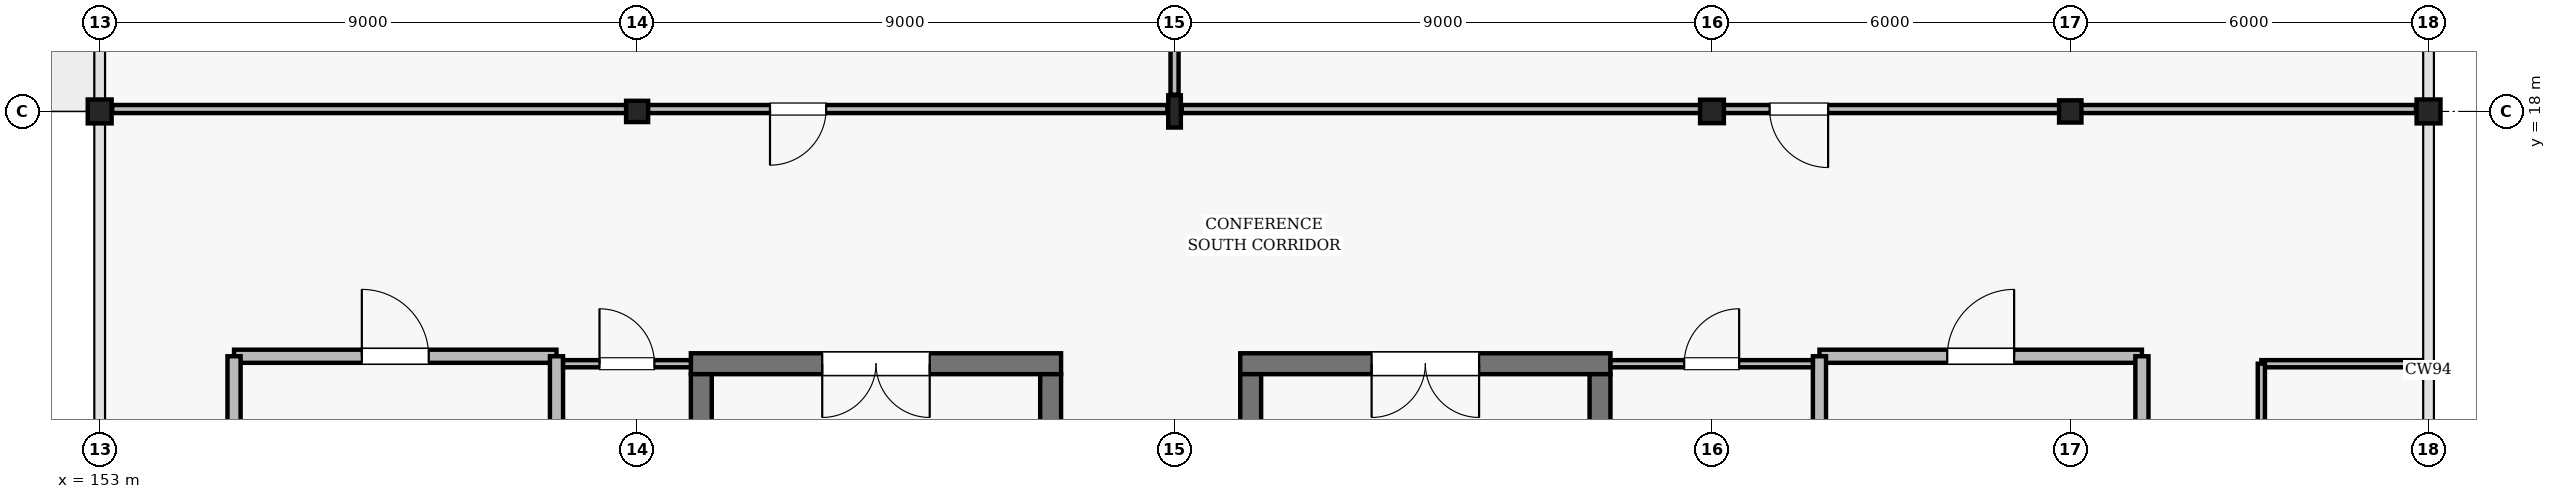
"""IFC4 building model, lengths in metres.
Left out: names, types, materials, properties, quantities, classifications, styles, units other than length and angle.
Written with IfcOpenShell. Run it as: python <this file> out.ifc"""

import sys

from ifc_helpers import new_model, si_unit, direction, frame, frame_2d, origin, origin_2d, place, context, subcontext, project, spatial, rectangle, hollow_rectangle, i_section, extrude, element, fill, save


model = new_model("IFC4")
c1 = context("Model", 3, precision=1e-05, world=origin(), true_north=direction((0.0, 1.0)))
c2 = subcontext(c1, "Body", "Model", "MODEL_VIEW")
j1 = project(units=[si_unit("LENGTHUNIT", "METRE"), si_unit("PLANEANGLEUNIT", "RADIAN")], contexts=[c1])
p1 = place(None, origin())
s1 = spatial("IfcSite", under=j1, at=p1, CompositionType="ELEMENT")
p2 = place(p1, origin())
s2 = spatial("IfcBuilding", under=s1, at=p2, CompositionType="ELEMENT")
p3 = place(p2, frame((0.0, 0.0, 15.6)))
s3 = spatial("IfcBuildingStorey", under=s2, at=p3, CompositionType="ELEMENT", Elevation=15.6)
p4 = place(p3, frame((153.0, 18.0, 0.0), z_axis=(0.0, 0.0, 1.0), x_axis=(1.0, 0.0, 0.0)))
e1 = element("IfcColumn", 1, at=p4, inside=s3, PredefinedType="COLUMN", context=c2, shape_type="SweptSolid", body=[
    extrude(hollow_rectangle(XDim=0.4, YDim=0.4, WallThickness=0.016, InnerFilletRadius=0.016, OuterFilletRadius=0.032, at=origin_2d()), origin(), (0.0, 0.0, 1.0), 4.8),
])
p5 = place(p3, frame((162.0, 18.0, 0.0), z_axis=(0.0, 0.0, 1.0), x_axis=(1.0, 0.0, 0.0)))
e2 = element("IfcColumn", 2, at=p5, inside=s3, PredefinedType="COLUMN", context=c2, shape_type="SweptSolid", body=[
    extrude(i_section(OverallWidth=0.369, OverallDepth=0.356, WebThickness=0.011, FlangeThickness=0.018, FilletRadius=0.015, at=origin_2d()), origin(), (0.0, 0.0, 1.0), 4.8),
])
p6 = place(p3, frame((171.0, 18.0, 0.0), z_axis=(0.0, 0.0, 1.0), x_axis=(1.0, 0.0, 0.0)))
e3 = element("IfcColumn", 3, at=p6, inside=s3, PredefinedType="COLUMN", context=c2, shape_type="SweptSolid", body=[
    extrude(i_section(OverallWidth=0.211, OverallDepth=0.539, WebThickness=0.012, FlangeThickness=0.019, FilletRadius=0.014, at=origin_2d()), origin(), (0.0, 0.0, 1.0), 4.8),
])
p7 = place(p3, frame((180.0, 18.0, 0.0), z_axis=(0.0, 0.0, 1.0), x_axis=(1.0, 0.0, 0.0)))
e4 = element("IfcColumn", 4, at=p7, inside=s3, PredefinedType="COLUMN", context=c2, shape_type="SweptSolid", body=[
    extrude(i_section(OverallWidth=0.399, OverallDepth=0.393, WebThickness=0.023, FlangeThickness=0.037, FilletRadius=0.018, at=origin_2d()), origin(), (0.0, 0.0, 1.0), 4.8),
])
p8 = place(p3, frame((186.0, 18.0, 0.0), z_axis=(0.0, 0.0, 1.0), x_axis=(1.0, 0.0, 0.0)))
e5 = element("IfcColumn", 5, at=p8, inside=s3, PredefinedType="COLUMN", context=c2, shape_type="SweptSolid", body=[
    extrude(i_section(OverallWidth=0.374, OverallDepth=0.372, WebThickness=0.016, FlangeThickness=0.026, FilletRadius=0.016, at=origin_2d()), origin(), (0.0, 0.0, 1.0), 4.8),
])
p9 = place(p3, frame((192.0, 18.0, 0.0), z_axis=(0.0, 0.0, 1.0), x_axis=(1.0, 0.0, 0.0)))
e6 = element("IfcColumn", 6, at=p9, inside=s3, PredefinedType="COLUMN", context=c2, shape_type="SweptSolid", body=[
    extrude(hollow_rectangle(XDim=0.4, YDim=0.4, WallThickness=0.016, InnerFilletRadius=0.016, OuterFilletRadius=0.032, at=origin_2d()), origin(), (0.0, 0.0, 1.0), 4.8),
])
p10 = place(p3, frame((169.1, 13.775, 0.0), z_axis=(0.0, 0.0, 1.0), x_axis=(-1.0, 0.0, 0.0)))
e7 = element("IfcWall", 7, at=p10, inside=s3, PredefinedType="SHEAR", context=c2, shape_type="SweptSolid", body=[
    extrude(rectangle(XDim=6.2, YDim=0.35, at=frame_2d((3.1, 0.0))), origin(), (0.0, 0.0, 1.0), 4.6),
])
p11 = place(p10, frame((2.2, 0.0, 0.0)))
e8 = element("IfcOpeningElement", 8, at=p11, cuts=e7, PredefinedType="OPENING", context=c2, shape_type="SweptSolid", body=[
    extrude(rectangle(XDim=1.8, YDim=2.2, at=frame_2d((0.9, 1.1))), frame((0.0, 0.185, 0.0), z_axis=(0.0, -1.0, 0.0), x_axis=(1.0, 0.0, 0.0)), (0.0, 0.0, 1.0), 0.37),
])
for number, where, z_axis, x_axis in (
    (9, (163.075, 13.6, 0.0), (0.0, 0.0, 1.0), (0.0, -1.0, 0.0)),
    (10, (168.925, 2.2, 0.0), (0.0, 0.0, 1.0), (0.0, 1.0, 0.0)),
):
    element("IfcWall", number, at=place(p3, frame(where, z_axis=z_axis, x_axis=x_axis)), inside=s3, PredefinedType="SHEAR", context=c2, shape_type="SweptSolid", body=[
        extrude(rectangle(XDim=11.4, YDim=0.35, at=frame_2d((5.7, 0.0))), origin(), (0.0, 0.0, 1.0), 4.6),
    ])
p12 = place(p3, frame((178.3, 13.775, 0.0), z_axis=(0.0, 0.0, 1.0), x_axis=(-1.0, 0.0, 0.0)))
e11 = element("IfcWall", 11, at=p12, inside=s3, PredefinedType="SHEAR", context=c2, shape_type="SweptSolid", body=[
    extrude(rectangle(XDim=6.2, YDim=0.35, at=frame_2d((3.1, 0.0))), origin(), (0.0, 0.0, 1.0), 4.6),
])
p13 = place(p12, frame((2.2, 0.0, 0.0)))
e12 = element("IfcOpeningElement", 12, at=p13, cuts=e11, PredefinedType="OPENING", context=c2, shape_type="SweptSolid", body=[
    extrude(rectangle(XDim=1.8, YDim=2.2, at=frame_2d((0.9, 1.1))), frame((0.0, 0.185, 0.0), z_axis=(0.0, -1.0, 0.0), x_axis=(1.0, 0.0, 0.0)), (0.0, 0.0, 1.0), 0.37),
])
for number, where, z_axis, x_axis in (
    (13, (172.275, 13.6, 0.0), (0.0, 0.0, 1.0), (0.0, -1.0, 0.0)),
    (14, (178.125, 2.2, 0.0), (0.0, 0.0, 1.0), (0.0, 1.0, 0.0)),
):
    element("IfcWall", number, at=place(p3, frame(where, z_axis=z_axis, x_axis=x_axis)), inside=s3, PredefinedType="SHEAR", context=c2, shape_type="SweptSolid", body=[
        extrude(rectangle(XDim=11.4, YDim=0.35, at=frame_2d((5.7, 0.0))), origin(), (0.0, 0.0, 1.0), 4.6),
    ])
p14 = place(p3, frame((155.25, 13.9, 0.0), z_axis=(0.0, 0.0, 1.0), x_axis=(1.0, 0.0, 0.0)))
e15 = element("IfcWall", 15, at=p14, inside=s3, PredefinedType="SOLIDWALL", context=c2, shape_type="SweptSolid", body=[
    extrude(rectangle(XDim=5.4, YDim=0.22, at=frame_2d((2.7, 0.0))), origin(), (0.0, 0.0, 1.0), 4.6),
])
p15 = place(p14, frame((2.14, 0.0, 0.0)))
e16 = element("IfcOpeningElement", 16, at=p15, cuts=e15, PredefinedType="OPENING", context=c2, shape_type="SweptSolid", body=[
    extrude(rectangle(XDim=1.12, YDim=2.2, at=frame_2d((0.56, 1.1))), frame((0.0, 0.12, 0.0), z_axis=(0.0, -1.0, 0.0), x_axis=(1.0, 0.0, 0.0)), (0.0, 0.0, 1.0), 0.24),
])
for number, where, z_axis, x_axis in (
    (17, (155.25, 10.85, 0.0), (0.0, 0.0, 1.0), (0.0, 1.0, 0.0)),
    (18, (160.65, 10.85, 0.0), (0.0, 0.0, 1.0), (0.0, 1.0, 0.0)),
):
    element("IfcWall", number, at=place(p3, frame(where, z_axis=z_axis, x_axis=x_axis)), inside=s3, PredefinedType="SOLIDWALL", context=c2, shape_type="SweptSolid", body=[
        extrude(rectangle(XDim=3.05, YDim=0.22, at=frame_2d((1.525, 0.0))), origin(), (0.0, 0.0, 1.0), 4.6),
    ])
p16 = place(p3, frame((181.8, 13.9, 0.0), z_axis=(0.0, 0.0, 1.0), x_axis=(1.0, 0.0, 0.0)))
e19 = element("IfcWall", 19, at=p16, inside=s3, PredefinedType="SOLIDWALL", context=c2, shape_type="SweptSolid", body=[
    extrude(rectangle(XDim=5.4, YDim=0.22, at=frame_2d((2.7, 0.0))), origin(), (0.0, 0.0, 1.0), 4.6),
])
p17 = place(p16, frame((2.14, 0.0, 0.0)))
e20 = element("IfcOpeningElement", 20, at=p17, cuts=e19, PredefinedType="OPENING", context=c2, shape_type="SweptSolid", body=[
    extrude(rectangle(XDim=1.12, YDim=2.2, at=frame_2d((0.56, 1.1))), frame((0.0, 0.12, 0.0), z_axis=(0.0, -1.0, 0.0), x_axis=(1.0, 0.0, 0.0)), (0.0, 0.0, 1.0), 0.24),
])
for number, where, z_axis, x_axis in (
    (21, (181.8, 10.85, 0.0), (0.0, 0.0, 1.0), (0.0, 1.0, 0.0)),
    (22, (187.2, 10.85, 0.0), (0.0, 0.0, 1.0), (0.0, 1.0, 0.0)),
):
    element("IfcWall", number, at=place(p3, frame(where, z_axis=z_axis, x_axis=x_axis)), inside=s3, PredefinedType="SOLIDWALL", context=c2, shape_type="SweptSolid", body=[
        extrude(rectangle(XDim=3.05, YDim=0.22, at=frame_2d((1.525, 0.0))), origin(), (0.0, 0.0, 1.0), 4.6),
    ])
p18 = place(p3, frame((160.76, 13.775, 0.0), z_axis=(0.0, 0.0, 1.0), x_axis=(1.0, 0.0, 0.0)))
e23 = element("IfcWall", 23, at=p18, inside=s3, PredefinedType="PARTITIONING", context=c2, shape_type="SweptSolid", body=[
    extrude(rectangle(XDim=2.14, YDim=0.12, at=frame_2d((1.07, 0.0))), origin(), (0.0, 0.0, 1.0), 3.901),
])
p19 = place(p18, frame((0.61, 0.0, 0.0)))
e24 = element("IfcOpeningElement", 24, at=p19, cuts=e23, PredefinedType="OPENING", context=c2, shape_type="SweptSolid", body=[
    extrude(rectangle(XDim=0.92, YDim=2.12, at=frame_2d((0.46, 1.06))), frame((0.0, 0.07, 0.0), z_axis=(0.0, -1.0, 0.0), x_axis=(1.0, 0.0, 0.0)), (0.0, 0.0, 1.0), 0.14),
])
p20 = place(p3, frame((178.3, 13.775, 0.0), z_axis=(0.0, 0.0, 1.0), x_axis=(1.0, 0.0, 0.0)))
e25 = element("IfcWall", 25, at=p20, inside=s3, PredefinedType="PARTITIONING", context=c2, shape_type="SweptSolid", body=[
    extrude(rectangle(XDim=3.39, YDim=0.12, at=frame_2d((1.695, 0.0))), origin(), (0.0, 0.0, 1.0), 3.812),
])
p21 = place(p20, frame((1.235, 0.0, 0.0)))
e26 = element("IfcOpeningElement", 26, at=p21, cuts=e25, PredefinedType="OPENING", context=c2, shape_type="SweptSolid", body=[
    extrude(rectangle(XDim=0.92, YDim=2.12, at=frame_2d((0.46, 1.06))), frame((0.0, 0.07, 0.0), z_axis=(0.0, -1.0, 0.0), x_axis=(1.0, 0.0, 0.0)), (0.0, 0.0, 1.0), 0.14),
])
p22 = place(p3, frame((189.2, 13.775, 0.0), z_axis=(0.0, 0.0, 1.0), x_axis=(1.0, 0.0, 0.0)))
e27 = element("IfcWall", 27, at=p22, inside=s3, PredefinedType="PARTITIONING", context=c2, shape_type="SweptSolid", body=[
    extrude(rectangle(XDim=2.788, YDim=0.12, at=frame_2d((1.394, 0.0))), origin(), (0.0, 0.0, 1.0), 4.119),
])
p23 = place(p3, frame((189.2, 9.65, 0.0), z_axis=(0.0, 0.0, 1.0), x_axis=(0.0, 1.0, 0.0)))
e28 = element("IfcWall", 28, at=p23, inside=s3, PredefinedType="PARTITIONING", context=c2, shape_type="SweptSolid", body=[
    extrude(rectangle(XDim=4.125, YDim=0.12, at=frame_2d((2.062, 0.0))), origin(), (0.0, 0.0, 1.0), 4.6),
])
p24 = place(p23, frame((1.552, 0.0, 0.0)))
e29 = element("IfcOpeningElement", 29, at=p24, cuts=e28, PredefinedType="OPENING", context=c2, shape_type="SweptSolid", body=[
    extrude(rectangle(XDim=1.02, YDim=2.16, at=frame_2d((0.51, 1.08))), frame((0.0, 0.07, 0.0), z_axis=(0.0, -1.0, 0.0), x_axis=(1.0, 0.0, 0.0)), (0.0, 0.0, 1.0), 0.14),
])
p25 = place(p3, frame((171.0, 36.0, 0.0), z_axis=(0.0, 0.0, 1.0), x_axis=(0.0, -1.0, 0.0)))
e30 = element("IfcWall", 30, at=p25, inside=s3, PredefinedType="PARTITIONING", context=c2, shape_type="SweptSolid", body=[
    extrude(rectangle(XDim=17.72, YDim=0.135, at=frame_2d((8.86, 0.0))), origin(), (0.0, 0.0, 1.0), 3.673),
])
p26 = place(p3, frame((170.88, 18.04, 0.0), z_axis=(0.0, 0.0, 1.0), x_axis=(-1.0, 0.0, 0.0)))
e31 = element("IfcWall", 31, at=p26, inside=s3, PredefinedType="PARTITIONING", context=c2, shape_type="SweptSolid", body=[
    extrude(rectangle(XDim=17.67, YDim=0.135, at=frame_2d((8.835, 0.0))), origin(), (0.0, 0.0, 1.0), 3.73),
])
p27 = place(p26, frame((5.715, 0.0, 0.0)))
e32 = element("IfcOpeningElement", 32, at=p27, cuts=e31, PredefinedType="OPENING", context=c2, shape_type="SweptSolid", body=[
    extrude(rectangle(XDim=0.94, YDim=2.15, at=frame_2d((0.47, 1.075))), frame((0.0, 0.078, 0.0), z_axis=(0.0, -1.0, 0.0), x_axis=(1.0, 0.0, 0.0)), (0.0, 0.0, 1.0), 0.155),
])
p28 = place(p3, frame((191.79, 18.04, 0.0), z_axis=(0.0, 0.0, 1.0), x_axis=(-1.0, 0.0, 0.0)))
e33 = element("IfcWall", 33, at=p28, inside=s3, PredefinedType="PARTITIONING", context=c2, shape_type="SweptSolid", body=[
    extrude(rectangle(XDim=20.67, YDim=0.135, at=frame_2d((10.335, 0.0))), origin(), (0.0, 0.0, 1.0), 3.73),
])
p29 = place(p28, frame((9.845, 0.0, 0.0)))
e34 = element("IfcOpeningElement", 34, at=p29, cuts=e33, PredefinedType="OPENING", context=c2, shape_type="SweptSolid", body=[
    extrude(rectangle(XDim=0.98, YDim=2.15, at=frame_2d((0.49, 1.075))), frame((0.0, 0.078, 0.0), z_axis=(0.0, -1.0, 0.0), x_axis=(1.0, 0.0, 0.0)), (0.0, 0.0, 1.0), 0.155),
])
p30 = place(p11, origin())
e35 = element("IfcDoor", 35, at=p30, inside=s3, OperationType="DOUBLE_DOOR_SINGLE_SWING", PredefinedType="DOOR", context=c2, shape_type="SweptSolid", body=[
    extrude(rectangle(XDim=1.8, YDim=2.2, at=frame_2d((0.9, 1.1))), frame((0.0, 0.025, 0.0), z_axis=(0.0, -1.0, 0.0), x_axis=(1.0, 0.0, 0.0)), (0.0, 0.0, 1.0), 0.05),
])
fill(e8, e35)
p31 = place(p13, origin())
e36 = element("IfcDoor", 36, at=p31, inside=s3, OperationType="DOUBLE_DOOR_SINGLE_SWING", PredefinedType="DOOR", context=c2, shape_type="SweptSolid", body=[
    extrude(rectangle(XDim=1.8, YDim=2.2, at=frame_2d((0.9, 1.1))), frame((0.0, 0.025, 0.0), z_axis=(0.0, -1.0, 0.0), x_axis=(1.0, 0.0, 0.0)), (0.0, 0.0, 1.0), 0.05),
])
fill(e12, e36)
p32 = place(p15, origin())
e37 = element("IfcDoor", 37, at=p32, inside=s3, OperationType="SINGLE_SWING_LEFT", PredefinedType="DOOR", context=c2, shape_type="SweptSolid", body=[
    extrude(rectangle(XDim=1.12, YDim=2.2, at=frame_2d((0.56, 1.1))), frame((0.0, 0.025, 0.0), z_axis=(0.0, -1.0, 0.0), x_axis=(1.0, 0.0, 0.0)), (0.0, 0.0, 1.0), 0.05),
])
fill(e16, e37)
p33 = place(p17, origin())
e38 = element("IfcDoor", 38, at=p33, inside=s3, OperationType="SINGLE_SWING_RIGHT", PredefinedType="DOOR", context=c2, shape_type="SweptSolid", body=[
    extrude(rectangle(XDim=1.12, YDim=2.2, at=frame_2d((0.56, 1.1))), frame((0.0, 0.025, 0.0), z_axis=(0.0, -1.0, 0.0), x_axis=(1.0, 0.0, 0.0)), (0.0, 0.0, 1.0), 0.05),
])
fill(e20, e38)
p34 = place(p19, origin())
e39 = element("IfcDoor", 39, at=p34, inside=s3, OperationType="SINGLE_SWING_LEFT", PredefinedType="DOOR", context=c2, shape_type="SweptSolid", body=[
    extrude(rectangle(XDim=0.92, YDim=2.12, at=frame_2d((0.46, 1.06))), frame((0.0, 0.025, 0.0), z_axis=(0.0, -1.0, 0.0), x_axis=(1.0, 0.0, 0.0)), (0.0, 0.0, 1.0), 0.05),
])
fill(e24, e39)
p35 = place(p21, origin())
e40 = element("IfcDoor", 40, at=p35, inside=s3, OperationType="SINGLE_SWING_RIGHT", PredefinedType="DOOR", context=c2, shape_type="SweptSolid", body=[
    extrude(rectangle(XDim=0.92, YDim=2.12, at=frame_2d((0.46, 1.06))), frame((0.0, 0.025, 0.0), z_axis=(0.0, -1.0, 0.0), x_axis=(1.0, 0.0, 0.0)), (0.0, 0.0, 1.0), 0.05),
])
fill(e26, e40)
p36 = place(p27, origin())
e41 = element("IfcDoor", 41, at=p36, inside=s3, OperationType="SINGLE_SWING_RIGHT", PredefinedType="DOOR", context=c2, shape_type="SweptSolid", body=[
    extrude(rectangle(XDim=0.94, YDim=2.15, at=frame_2d((0.47, 1.075))), frame((0.0, 0.025, 0.0), z_axis=(0.0, -1.0, 0.0), x_axis=(1.0, 0.0, 0.0)), (0.0, 0.0, 1.0), 0.05),
])
fill(e32, e41)
p37 = place(p29, origin())
e42 = element("IfcDoor", 42, at=p37, inside=s3, OperationType="SINGLE_SWING_LEFT", PredefinedType="DOOR", context=c2, shape_type="SweptSolid", body=[
    extrude(rectangle(XDim=0.98, YDim=2.15, at=frame_2d((0.49, 1.075))), frame((0.0, 0.025, 0.0), z_axis=(0.0, -1.0, 0.0), x_axis=(1.0, 0.0, 0.0)), (0.0, 0.0, 1.0), 0.05),
])
fill(e34, e42)
save(model, sys.argv[1])
